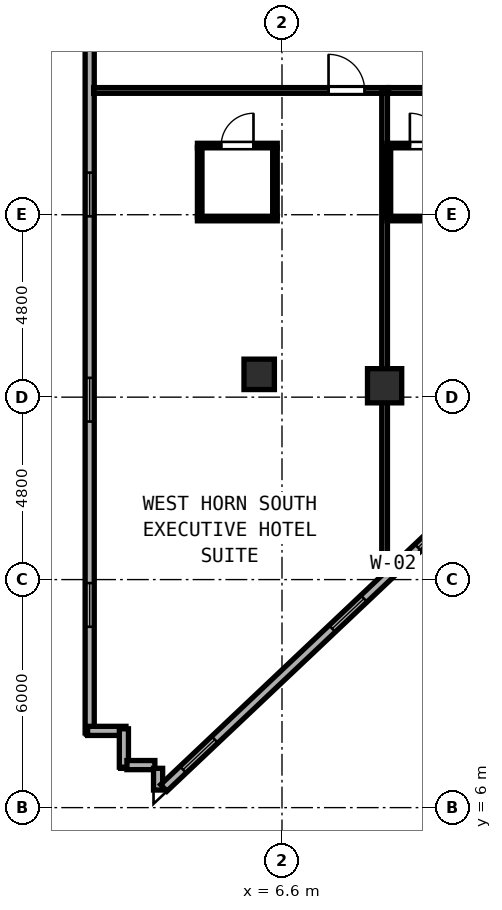
"""IFC4 building model, lengths in metres.
Left out: names, types, materials, properties, quantities, classifications, styles, units other than length and angle.
Written with IfcOpenShell. Run it as: python <this file> out.ifc"""

import sys

from ifc_helpers import new_model, si_unit, direction, frame, frame_2d, origin, origin_2d, place, context, subcontext, project, spatial, rectangle, hollow_rectangle, extrude, element, fill, save


model = new_model("IFC4")
c1 = context("Model", 3, precision=1e-05, world=origin(), true_north=direction((0.0, 1.0)))
c2 = subcontext(c1, "Body", "Model", "MODEL_VIEW")
j1 = project(units=[si_unit("LENGTHUNIT", "METRE"), si_unit("PLANEANGLEUNIT", "RADIAN")], contexts=[c1])
p1 = place(None, origin())
s1 = spatial("IfcSite", under=j1, at=p1, CompositionType="ELEMENT")
p2 = place(p1, origin())
s2 = spatial("IfcBuilding", under=s1, at=p2, CompositionType="ELEMENT")
p3 = place(p2, frame((0.0, 0.0, 128.8)))
s3 = spatial("IfcBuildingStorey", under=s2, at=p3, CompositionType="ELEMENT", Elevation=128.8)
p4 = place(p3, frame((6.0, 17.4, 0.0), z_axis=(0.0, 0.0, 1.0), x_axis=(1.0, 0.0, 0.0)))
e1 = element("IfcColumn", 1, at=p4, inside=s3, PredefinedType="COLUMN", context=c2, shape_type="SweptSolid", body=[
    extrude(hollow_rectangle(XDim=0.8, YDim=0.8, WallThickness=0.03, at=origin_2d()), origin(), (0.0, 0.0, 1.0), 3.8),
])
p5 = place(p3, frame((9.3, 17.1, 0.0), z_axis=(0.0, 0.0, 1.0), x_axis=(1.0, 0.0, 0.0)))
e2 = element("IfcColumn", 2, at=p5, inside=s3, PredefinedType="COLUMN", context=c2, shape_type="SweptSolid", body=[
    extrude(hollow_rectangle(XDim=0.9, YDim=0.9, WallThickness=0.034, at=origin_2d()), origin(), (0.0, 0.0, 1.0), 3.8),
])
p6 = place(p3, frame((1.54, 28.808, 0.0), z_axis=(0.0, 0.0, 1.0), x_axis=(0.0, -1.0, 0.0)))
e3 = element("IfcWall", 3, at=p6, inside=s3, PredefinedType="SOLIDWALL", context=c2, shape_type="SweptSolid", body=[
    extrude(rectangle(XDim=20.844, YDim=0.24, at=frame_2d((10.422, 0.0))), origin(), (0.0, 0.0, 1.0), 3.6),
])
p7 = place(p6, frame((0.543, 0.0, 0.85)))
e4 = element("IfcOpeningElement", 4, at=p7, cuts=e3, PredefinedType="OPENING", context=c2, shape_type="SweptSolid", body=[
    extrude(rectangle(XDim=1.15, YDim=1.8, at=frame_2d((0.575, 0.9))), frame((0.0, 0.13, 0.0), z_axis=(0.0, -1.0, 0.0), x_axis=(1.0, 0.0, 0.0)), (0.0, 0.0, 1.0), 0.26),
])
p8 = place(p6, frame((6.1, 0.0, 0.85)))
e5 = element("IfcOpeningElement", 5, at=p8, cuts=e3, PredefinedType="OPENING", context=c2, shape_type="SweptSolid", body=[
    extrude(rectangle(XDim=1.15, YDim=1.8, at=frame_2d((0.575, 0.9))), frame((0.0, 0.13, 0.0), z_axis=(0.0, -1.0, 0.0), x_axis=(1.0, 0.0, 0.0)), (0.0, 0.0, 1.0), 0.26),
])
p9 = place(p6, frame((11.5, 0.0, 0.85)))
e6 = element("IfcOpeningElement", 6, at=p9, cuts=e3, PredefinedType="OPENING", context=c2, shape_type="SweptSolid", body=[
    extrude(rectangle(XDim=1.15, YDim=1.8, at=frame_2d((0.575, 0.9))), frame((0.0, 0.13, 0.0), z_axis=(0.0, -1.0, 0.0), x_axis=(1.0, 0.0, 0.0)), (0.0, 0.0, 1.0), 0.26),
])
p10 = place(p6, frame((16.9, 0.0, 0.85)))
e7 = element("IfcOpeningElement", 7, at=p10, cuts=e3, PredefinedType="OPENING", context=c2, shape_type="SweptSolid", body=[
    extrude(rectangle(XDim=1.15, YDim=1.8, at=frame_2d((0.575, 0.9))), frame((0.0, 0.13, 0.0), z_axis=(0.0, -1.0, 0.0), x_axis=(1.0, 0.0, 0.0)), (0.0, 0.0, 1.0), 0.26),
])
for number, where, z_axis, x_axis in (
    (8, (1.485, 8.019, 0.0), (0.0, 0.0, 1.0), (1.0, 0.0, 0.0)),
    (9, (2.44, 8.074, 0.0), (0.0, 0.0, 1.0), (0.0, -1.0, 0.0)),
):
    element("IfcWall", number, at=place(p3, frame(where, z_axis=z_axis, x_axis=x_axis)), inside=s3, PredefinedType="SOLIDWALL", context=c2, shape_type="SweptSolid", body=[
        extrude(rectangle(XDim=1.01, YDim=0.24, at=frame_2d((0.505, 0.0))), origin(), (0.0, 0.0, 1.0), 3.6),
    ])
p11 = place(p3, frame((2.52, 7.119, 0.0), z_axis=(0.0, 0.0, 1.0), x_axis=(1.0, 0.0, 0.0)))
e10 = element("IfcWall", 10, at=p11, inside=s3, PredefinedType="SOLIDWALL", context=c2, shape_type="SweptSolid", body=[
    extrude(rectangle(XDim=0.735, YDim=0.24, at=frame_2d((0.367, 0.0))), origin(), (0.0, 0.0, 1.0), 3.6),
])
p12 = place(p3, frame((3.34, 7.034, 0.0), z_axis=(0.0, 0.0, 1.0), x_axis=(0.0, -1.0, 0.0)))
e11 = element("IfcWall", 11, at=p12, inside=s3, PredefinedType="SOLIDWALL", context=c2, shape_type="SweptSolid", body=[
    extrude(rectangle(XDim=0.571, YDim=0.24, at=frame_2d((0.286, 0.0))), origin(), (0.0, 0.0, 1.0), 3.6),
])
p13 = place(p3, frame((3.489, 6.518, 0.0), z_axis=(0.0, 0.0, 1.0), x_axis=(0.726640160789, 0.687018250652, 0.0)))
e12 = element("IfcWall", 12, at=p13, inside=s3, PredefinedType="SOLIDWALL", context=c2, shape_type="SweptSolid", body=[
    extrude(rectangle(XDim=11.603, YDim=0.24, at=frame_2d((5.801, 0.0))), origin(), (0.0, 0.0, 1.0), 3.6),
])
p14 = place(p13, frame((0.7, 0.0, 0.85)))
e13 = element("IfcOpeningElement", 13, at=p14, cuts=e12, PredefinedType="OPENING", context=c2, shape_type="SweptSolid", body=[
    extrude(rectangle(XDim=1.15, YDim=1.8, at=frame_2d((0.575, 0.9))), frame((0.0, 0.13, 0.0), z_axis=(0.0, -1.0, 0.0), x_axis=(1.0, 0.0, 0.0)), (0.0, 0.0, 1.0), 0.26),
])
p15 = place(p13, frame((6.1, 0.0, 0.85)))
e14 = element("IfcOpeningElement", 14, at=p15, cuts=e12, PredefinedType="OPENING", context=c2, shape_type="SweptSolid", body=[
    extrude(rectangle(XDim=1.15, YDim=1.8, at=frame_2d((0.575, 0.9))), frame((0.0, 0.13, 0.0), z_axis=(0.0, -1.0, 0.0), x_axis=(1.0, 0.0, 0.0)), (0.0, 0.0, 1.0), 0.26),
])
p16 = place(p13, frame((9.206, 0.0, 0.85)))
e15 = element("IfcOpeningElement", 15, at=p16, cuts=e12, PredefinedType="OPENING", context=c2, shape_type="SweptSolid", body=[
    extrude(rectangle(XDim=1.15, YDim=1.8, at=frame_2d((0.575, 0.9))), frame((0.0, 0.13, 0.0), z_axis=(0.0, -1.0, 0.0), x_axis=(1.0, 0.0, 0.0)), (0.0, 0.0, 1.0), 0.26),
])
p17 = place(p3, frame((1.645, 24.87, 0.0), z_axis=(0.0, 0.0, 1.0), x_axis=(1.0, 0.0, 0.0)))
e16 = element("IfcWall", 16, at=p17, inside=s3, PredefinedType="PARTITIONING", context=c2, shape_type="SweptSolid", body=[
    extrude(rectangle(XDim=7.755, YDim=0.15, at=frame_2d((3.877, 0.0))), origin(), (0.0, 0.0, 1.0), 3.6),
])
p18 = place(p17, frame((7.13, 0.0, 0.0), z_axis=(0.0, 0.0, 1.0), x_axis=(-1.0, 0.0, 0.0)))
e17 = element("IfcOpeningElement", 17, at=p18, cuts=e16, PredefinedType="OPENING", context=c2, shape_type="SweptSolid", body=[
    extrude(rectangle(XDim=0.95, YDim=2.18, at=frame_2d((0.475, 1.09))), frame((0.0, 0.085, 0.0), z_axis=(0.0, -1.0, 0.0), x_axis=(1.0, 0.0, 0.0)), (0.0, 0.0, 1.0), 0.17),
])
p19 = place(p3, frame((9.3, 12.157, 0.0), z_axis=(0.0, 0.0, 1.0), x_axis=(0.0, 1.0, 0.0)))
e18 = element("IfcWall", 18, at=p19, inside=s3, PredefinedType="PARTITIONING", context=c2, shape_type="SweptSolid", body=[
    extrude(rectangle(XDim=12.653, YDim=0.15, at=frame_2d((6.327, 0.0))), origin(), (0.0, 0.0, 1.0), 3.6),
])
p20 = place(p3, frame((4.375, 23.42, 0.0), z_axis=(0.0, 0.0, 1.0), x_axis=(1.0, 0.0, 0.0)))
e19 = element("IfcWall", 19, at=p20, inside=s3, PredefinedType="PARTITIONING", context=c2, shape_type="SweptSolid", body=[
    extrude(rectangle(XDim=2.1, YDim=0.12, at=frame_2d((1.05, 0.0))), origin(), (0.0, 0.0, 1.0), 3.6),
])
p21 = place(p20, frame((1.475, 0.0, 0.0), z_axis=(0.0, 0.0, 1.0), x_axis=(-1.0, 0.0, 0.0)))
e20 = element("IfcOpeningElement", 20, at=p21, cuts=e19, PredefinedType="OPENING", context=c2, shape_type="SweptSolid", body=[
    extrude(rectangle(XDim=0.85, YDim=2.1, at=frame_2d((0.425, 1.05))), frame((0.0, 0.07, 0.0), z_axis=(0.0, -1.0, 0.0), x_axis=(1.0, 0.0, 0.0)), (0.0, 0.0, 1.0), 0.14),
])
p22 = place(p3, frame((4.375, 21.5, 0.0), z_axis=(0.0, 0.0, 1.0), x_axis=(1.0, 0.0, 0.0)))
e21 = element("IfcWall", 21, at=p22, inside=s3, PredefinedType="PARTITIONING", context=c2, shape_type="SweptSolid", body=[
    extrude(rectangle(XDim=2.1, YDim=0.12, at=frame_2d((1.05, 0.0))), origin(), (0.0, 0.0, 1.0), 3.6),
])
for number, where, z_axis, x_axis in (
    (22, (4.435, 21.545, 0.0), (0.0, 0.0, 1.0), (0.0, 1.0, 0.0)),
    (23, (6.415, 21.545, 0.0), (0.0, 0.0, 1.0), (0.0, 1.0, 0.0)),
):
    element("IfcWall", number, at=place(p3, frame(where, z_axis=z_axis, x_axis=x_axis)), inside=s3, PredefinedType="PARTITIONING", context=c2, shape_type="SweptSolid", body=[
        extrude(rectangle(XDim=1.83, YDim=0.12, at=frame_2d((0.915, 0.0))), origin(), (0.0, 0.0, 1.0), 3.6),
    ])
p23 = place(p3, frame((9.402, 24.87, 0.0), z_axis=(0.0, 0.0, 1.0), x_axis=(1.0, 0.0, 0.0)))
e24 = element("IfcWall", 24, at=p23, inside=s3, PredefinedType="PARTITIONING", context=c2, shape_type="SweptSolid", body=[
    extrude(rectangle(XDim=2.296, YDim=0.15, at=frame_2d((1.148, 0.0))), origin(), (0.0, 0.0, 1.0), 3.6),
])
p24 = place(p23, frame((1.934, 0.0, 0.0), z_axis=(0.0, 0.0, 1.0), x_axis=(-1.0, 0.0, 0.0)))
e25 = element("IfcOpeningElement", 25, at=p24, cuts=e24, PredefinedType="OPENING", context=c2, shape_type="SweptSolid", body=[
    extrude(rectangle(XDim=0.95, YDim=2.15, at=frame_2d((0.475, 1.075))), frame((0.0, 0.085, 0.0), z_axis=(0.0, -1.0, 0.0), x_axis=(1.0, 0.0, 0.0)), (0.0, 0.0, 1.0), 0.17),
])
p25 = place(p3, frame((9.36, 23.42, 0.0), z_axis=(0.0, 0.0, 1.0), x_axis=(1.0, 0.0, 0.0)))
e26 = element("IfcWall", 26, at=p25, inside=s3, PredefinedType="PARTITIONING", context=c2, shape_type="SweptSolid", body=[
    extrude(rectangle(XDim=2.08, YDim=0.12, at=frame_2d((1.04, 0.0))), origin(), (0.0, 0.0, 1.0), 3.6),
])
p26 = place(p25, frame((1.455, 0.0, 0.0), z_axis=(0.0, 0.0, 1.0), x_axis=(-1.0, 0.0, 0.0)))
e27 = element("IfcOpeningElement", 27, at=p26, cuts=e26, PredefinedType="OPENING", context=c2, shape_type="SweptSolid", body=[
    extrude(rectangle(XDim=0.85, YDim=2.1, at=frame_2d((0.425, 1.05))), frame((0.0, 0.07, 0.0), z_axis=(0.0, -1.0, 0.0), x_axis=(1.0, 0.0, 0.0)), (0.0, 0.0, 1.0), 0.14),
])
p27 = place(p3, frame((9.36, 21.5, 0.0), z_axis=(0.0, 0.0, 1.0), x_axis=(1.0, 0.0, 0.0)))
e28 = element("IfcWall", 28, at=p27, inside=s3, PredefinedType="PARTITIONING", context=c2, shape_type="SweptSolid", body=[
    extrude(rectangle(XDim=2.08, YDim=0.12, at=frame_2d((1.04, 0.0))), origin(), (0.0, 0.0, 1.0), 3.6),
])
p28 = place(p3, frame((9.4, 21.545, 0.0), z_axis=(0.0, 0.0, 1.0), x_axis=(0.0, 1.0, 0.0)))
e29 = element("IfcWall", 29, at=p28, inside=s3, PredefinedType="PARTITIONING", context=c2, shape_type="SweptSolid", body=[
    extrude(rectangle(XDim=1.83, YDim=0.12, at=frame_2d((0.915, 0.0))), origin(), (0.0, 0.0, 1.0), 3.6),
])
p29 = place(p8, origin())
e30 = element("IfcWindow", 30, at=p29, inside=s3, PartitioningType="SINGLE_PANEL", PredefinedType="WINDOW", context=c2, shape_type="SweptSolid", body=[
    extrude(rectangle(XDim=1.15, YDim=1.8, at=frame_2d((0.575, 0.9))), frame((0.0, 0.03, 0.0), z_axis=(0.0, -1.0, 0.0), x_axis=(1.0, 0.0, 0.0)), (0.0, 0.0, 1.0), 0.06),
])
fill(e5, e30)
p30 = place(p9, origin())
e31 = element("IfcWindow", 31, at=p30, inside=s3, PartitioningType="SINGLE_PANEL", PredefinedType="WINDOW", context=c2, shape_type="SweptSolid", body=[
    extrude(rectangle(XDim=1.15, YDim=1.8, at=frame_2d((0.575, 0.9))), frame((0.0, 0.03, 0.0), z_axis=(0.0, -1.0, 0.0), x_axis=(1.0, 0.0, 0.0)), (0.0, 0.0, 1.0), 0.06),
])
fill(e6, e31)
p31 = place(p10, origin())
e32 = element("IfcWindow", 32, at=p31, inside=s3, PartitioningType="SINGLE_PANEL", PredefinedType="WINDOW", context=c2, shape_type="SweptSolid", body=[
    extrude(rectangle(XDim=1.15, YDim=1.8, at=frame_2d((0.575, 0.9))), frame((0.0, 0.03, 0.0), z_axis=(0.0, -1.0, 0.0), x_axis=(1.0, 0.0, 0.0)), (0.0, 0.0, 1.0), 0.06),
])
fill(e7, e32)
p32 = place(p14, origin())
e33 = element("IfcWindow", 33, at=p32, inside=s3, PartitioningType="SINGLE_PANEL", PredefinedType="WINDOW", context=c2, shape_type="SweptSolid", body=[
    extrude(rectangle(XDim=1.15, YDim=1.8, at=frame_2d((0.575, 0.9))), frame((0.0, 0.03, 0.0), z_axis=(0.0, -1.0, 0.0), x_axis=(1.0, 0.0, 0.0)), (0.0, 0.0, 1.0), 0.06),
])
fill(e13, e33)
p33 = place(p15, origin())
e34 = element("IfcWindow", 34, at=p33, inside=s3, PartitioningType="SINGLE_PANEL", PredefinedType="WINDOW", context=c2, shape_type="SweptSolid", body=[
    extrude(rectangle(XDim=1.15, YDim=1.8, at=frame_2d((0.575, 0.9))), frame((0.0, 0.03, 0.0), z_axis=(0.0, -1.0, 0.0), x_axis=(1.0, 0.0, 0.0)), (0.0, 0.0, 1.0), 0.06),
])
fill(e14, e34)
p34 = place(p18, origin())
e35 = element("IfcDoor", 35, at=p34, inside=s3, OperationType="SINGLE_SWING_RIGHT", PredefinedType="DOOR", context=c2, shape_type="SweptSolid", body=[
    extrude(rectangle(XDim=0.95, YDim=2.18, at=frame_2d((0.475, 1.09))), frame((0.0, 0.025, 0.0), z_axis=(0.0, -1.0, 0.0), x_axis=(1.0, 0.0, 0.0)), (0.0, 0.0, 1.0), 0.05),
])
fill(e17, e35)
p35 = place(p21, origin())
e36 = element("IfcDoor", 36, at=p35, inside=s3, OperationType="SINGLE_SWING_LEFT", PredefinedType="DOOR", context=c2, shape_type="SweptSolid", body=[
    extrude(rectangle(XDim=0.85, YDim=2.1, at=frame_2d((0.425, 1.05))), frame((0.0, 0.025, 0.0), z_axis=(0.0, -1.0, 0.0), x_axis=(1.0, 0.0, 0.0)), (0.0, 0.0, 1.0), 0.05),
])
fill(e20, e36)
p36 = place(p26, origin())
e37 = element("IfcDoor", 37, at=p36, inside=s3, OperationType="SINGLE_SWING_RIGHT", PredefinedType="DOOR", context=c2, shape_type="SweptSolid", body=[
    extrude(rectangle(XDim=0.85, YDim=2.1, at=frame_2d((0.425, 1.05))), frame((0.0, 0.025, 0.0), z_axis=(0.0, -1.0, 0.0), x_axis=(1.0, 0.0, 0.0)), (0.0, 0.0, 1.0), 0.05),
])
fill(e27, e37)
p37 = place(p16, origin())
e38 = element("IfcWindow", 38, at=p37, inside=s3, PartitioningType="SINGLE_PANEL", PredefinedType="WINDOW", context=c2, shape_type="SweptSolid", body=[
    extrude(rectangle(XDim=1.15, YDim=1.8, at=frame_2d((0.575, 0.9))), frame((0.0, 0.03, 0.0), z_axis=(0.0, -1.0, 0.0), x_axis=(1.0, 0.0, 0.0)), (0.0, 0.0, 1.0), 0.06),
])
fill(e15, e38)
save(model, sys.argv[1])
